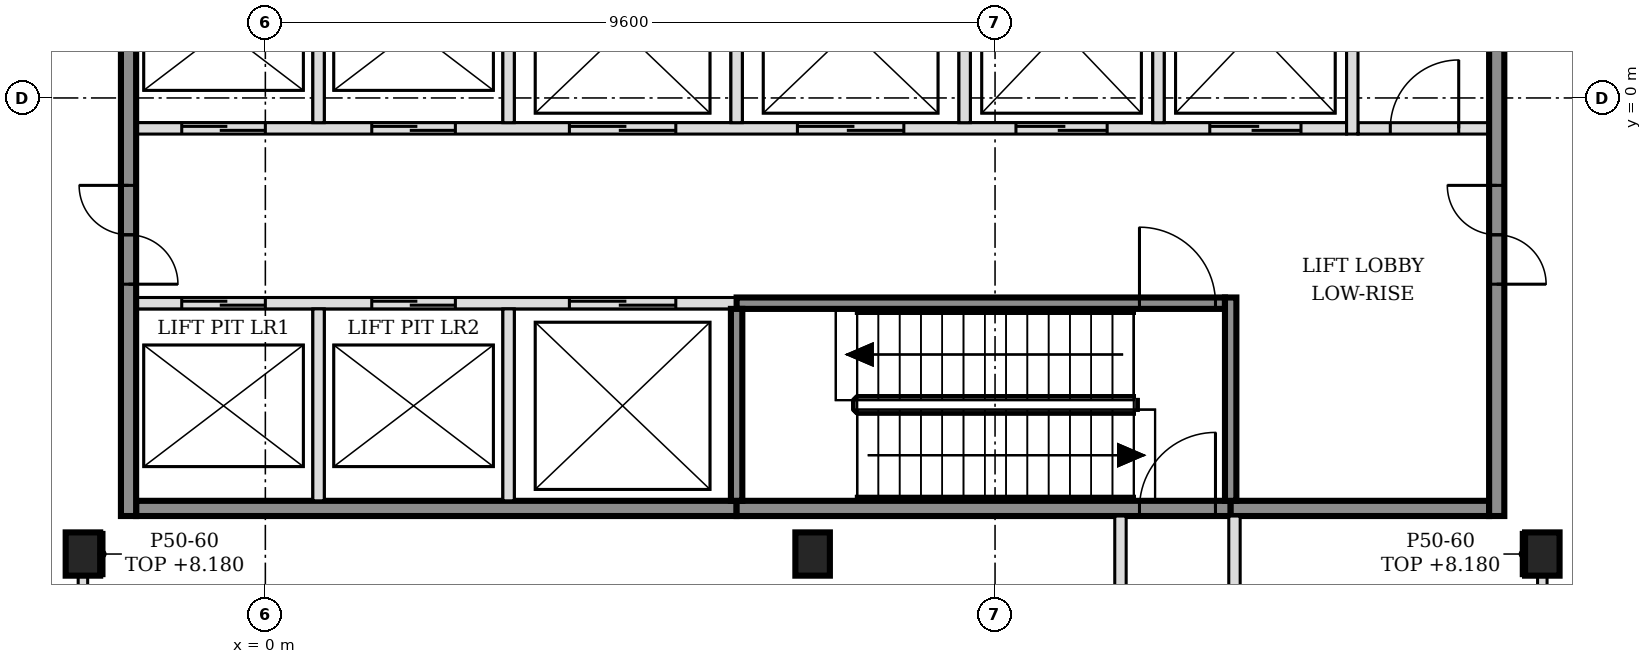
"""IFC4 building model, lengths in metres.
Left out: names, types, materials, properties, quantities, classifications, styles, units other than length and angle.
Written with IfcOpenShell. Run it as: python <this file> out.ifc"""

import sys

from ifc_helpers import new_model, si_unit, direction, frame, frame_2d, origin, origin_2d, place, context, subcontext, project, spatial, polyline, rectangle, i_section, outline, extrude, element, fill, save


model = new_model("IFC4")
c1 = context("Model", 3, precision=1e-05, world=origin(), true_north=direction((0.0, 1.0)))
c2 = subcontext(c1, "Body", "Model", "MODEL_VIEW")
j1 = project(units=[si_unit("LENGTHUNIT", "METRE"), si_unit("PLANEANGLEUNIT", "RADIAN")], contexts=[c1])
p1 = place(None, origin())
s1 = spatial("IfcSite", under=j1, at=p1, CompositionType="ELEMENT")
p2 = place(p1, origin())
s2 = spatial("IfcBuilding", under=s1, at=p2, CompositionType="ELEMENT")
p3 = place(p2, origin())
s3 = spatial("IfcBuildingStorey", under=s2, at=p3, CompositionType="ELEMENT", Elevation=0.0)
for number, where, z_axis, x_axis in (
    (1, (-2.4, -6.0, -0.25), (0.0, 0.0, 1.0), (1.0, 0.0, 0.0)),
    (2, (7.2, -6.0, -0.25), (0.0, 0.0, 1.0), (1.0, 0.0, 0.0)),
    (3, (16.8, -6.0, -0.25), (0.0, 0.0, 1.0), (1.0, 0.0, 0.0)),
):
    element("IfcColumn", number, at=place(p3, frame(where, z_axis=z_axis, x_axis=x_axis)), inside=s3, PredefinedType="COLUMN", context=c2, shape_type="SweptSolid", body=[
        extrude(i_section(OverallWidth=0.454, OverallDepth=0.569, WebThickness=0.078, FlangeThickness=0.125, FilletRadius=0.015, at=origin_2d()), origin(), (0.0, 0.0, 1.0), 9.05),
    ])
p4 = place(p3, frame((-1.7, -5.4, 0.0), z_axis=(0.0, 0.0, 1.0), x_axis=(1.0, 0.0, 0.0)))
e4 = element("IfcWall", 4, at=p4, inside=s3, PredefinedType="SOLIDWALL", context=c2, shape_type="SweptSolid", body=[
    extrude(rectangle(XDim=7.9, YDim=0.2, at=frame_2d((3.95, 0.0))), origin(), (0.0, 0.0, 1.0), 8.8),
])
p5 = place(p3, frame((6.2, -5.4, 0.0), z_axis=(0.0, 0.0, 1.0), x_axis=(1.0, 0.0, 0.0)))
e5 = element("IfcWall", 5, at=p5, inside=s3, PredefinedType="SOLIDWALL", context=c2, shape_type="SweptSolid", body=[
    extrude(rectangle(XDim=6.5, YDim=0.2, at=frame_2d((3.25, 0.0))), origin(), (0.0, 0.0, 1.0), 8.8),
])
p6 = place(p5, frame((5.3, 0.0, 0.0)))
e6 = element("IfcOpeningElement", 6, at=p6, cuts=e5, PredefinedType="OPENING", context=c2, shape_type="SweptSolid", body=[
    extrude(rectangle(XDim=1.0, YDim=2.1, at=frame_2d((0.5, 1.05))), frame((0.0, 0.11, 0.0), z_axis=(0.0, -1.0, 0.0), x_axis=(1.0, 0.0, 0.0)), (0.0, 0.0, 1.0), 0.22),
])
p7 = place(p3, frame((12.7, -5.4, 0.0), z_axis=(0.0, 0.0, 1.0), x_axis=(1.0, 0.0, 0.0)))
e7 = element("IfcWall", 7, at=p7, inside=s3, PredefinedType="SOLIDWALL", context=c2, shape_type="SweptSolid", body=[
    extrude(rectangle(XDim=3.4, YDim=0.2, at=frame_2d((1.7, 0.0))), origin(), (0.0, 0.0, 1.0), 8.8),
])
p8 = place(p3, frame((-1.7, -2.7, 0.0), z_axis=(0.0, 0.0, 1.0), x_axis=(1.0, 0.0, 0.0)))
e8 = element("IfcWall", 8, at=p8, inside=s3, PredefinedType="SOLIDWALL", context=c2, shape_type="SweptSolid", body=[
    extrude(rectangle(XDim=7.9, YDim=0.15, at=frame_2d((3.95, 0.0))), origin(), (0.0, 0.0, 1.0), 8.8),
])
p9 = place(p8, frame((0.6, 0.0, 0.0)))
e9 = element("IfcOpeningElement", 9, at=p9, cuts=e8, PredefinedType="OPENING", context=c2, shape_type="SweptSolid", body=[
    extrude(rectangle(XDim=1.1, YDim=2.1, at=frame_2d((0.55, 1.05))), frame((0.0, 0.085, 0.0), z_axis=(0.0, -1.0, 0.0), x_axis=(1.0, 0.0, 0.0)), (0.0, 0.0, 1.0), 0.17),
])
p10 = place(p8, frame((3.1, 0.0, 0.0)))
e10 = element("IfcOpeningElement", 10, at=p10, cuts=e8, PredefinedType="OPENING", context=c2, shape_type="SweptSolid", body=[
    extrude(rectangle(XDim=1.1, YDim=2.1, at=frame_2d((0.55, 1.05))), frame((0.0, 0.085, 0.0), z_axis=(0.0, -1.0, 0.0), x_axis=(1.0, 0.0, 0.0)), (0.0, 0.0, 1.0), 0.17),
])
p11 = place(p8, frame((5.7, 0.0, 0.0)))
e11 = element("IfcOpeningElement", 11, at=p11, cuts=e8, PredefinedType="OPENING", context=c2, shape_type="SweptSolid", body=[
    extrude(rectangle(XDim=1.4, YDim=2.1, at=frame_2d((0.7, 1.05))), frame((0.0, 0.085, 0.0), z_axis=(0.0, -1.0, 0.0), x_axis=(1.0, 0.0, 0.0)), (0.0, 0.0, 1.0), 0.17),
])
p12 = place(p3, frame((6.2, -2.7, 0.0), z_axis=(0.0, 0.0, 1.0), x_axis=(1.0, 0.0, 0.0)))
e12 = element("IfcWall", 12, at=p12, inside=s3, PredefinedType="SOLIDWALL", context=c2, shape_type="SweptSolid", body=[
    extrude(rectangle(XDim=6.425, YDim=0.15, at=frame_2d((3.212, 0.0))), origin(), (0.0, 0.0, 1.0), 8.8),
])
p13 = place(p12, frame((5.3, 0.0, 0.0)))
e13 = element("IfcOpeningElement", 13, at=p13, cuts=e12, PredefinedType="OPENING", context=c2, shape_type="SweptSolid", body=[
    extrude(rectangle(XDim=1.0, YDim=2.1, at=frame_2d((0.5, 1.05))), frame((0.0, 0.085, 0.0), z_axis=(0.0, -1.0, 0.0), x_axis=(1.0, 0.0, 0.0)), (0.0, 0.0, 1.0), 0.17),
])
p14 = place(p3, frame((-1.7, -0.4, 0.0), z_axis=(0.0, 0.0, 1.0), x_axis=(1.0, 0.0, 0.0)))
e14 = element("IfcWall", 14, at=p14, inside=s3, PredefinedType="SOLIDWALL", context=c2, shape_type="SweptSolid", body=[
    extrude(rectangle(XDim=15.925, YDim=0.15, at=frame_2d((7.962, 0.0))), origin(), (0.0, 0.0, 1.0), 8.8),
])
p15 = place(p14, frame((0.6, 0.0, 0.0)))
e15 = element("IfcOpeningElement", 15, at=p15, cuts=e14, PredefinedType="OPENING", context=c2, shape_type="SweptSolid", body=[
    extrude(rectangle(XDim=1.1, YDim=2.1, at=frame_2d((0.55, 1.05))), frame((0.0, 0.085, 0.0), z_axis=(0.0, -1.0, 0.0), x_axis=(1.0, 0.0, 0.0)), (0.0, 0.0, 1.0), 0.17),
])
p16 = place(p14, frame((3.1, 0.0, 0.0)))
e16 = element("IfcOpeningElement", 16, at=p16, cuts=e14, PredefinedType="OPENING", context=c2, shape_type="SweptSolid", body=[
    extrude(rectangle(XDim=1.1, YDim=2.1, at=frame_2d((0.55, 1.05))), frame((0.0, 0.085, 0.0), z_axis=(0.0, -1.0, 0.0), x_axis=(1.0, 0.0, 0.0)), (0.0, 0.0, 1.0), 0.17),
])
p17 = place(p14, frame((5.7, 0.0, 0.0)))
e17 = element("IfcOpeningElement", 17, at=p17, cuts=e14, PredefinedType="OPENING", context=c2, shape_type="SweptSolid", body=[
    extrude(rectangle(XDim=1.4, YDim=2.1, at=frame_2d((0.7, 1.05))), frame((0.0, 0.085, 0.0), z_axis=(0.0, -1.0, 0.0), x_axis=(1.0, 0.0, 0.0)), (0.0, 0.0, 1.0), 0.17),
])
p18 = place(p14, frame((8.7, 0.0, 0.0)))
e18 = element("IfcOpeningElement", 18, at=p18, cuts=e14, PredefinedType="OPENING", context=c2, shape_type="SweptSolid", body=[
    extrude(rectangle(XDim=1.4, YDim=2.1, at=frame_2d((0.7, 1.05))), frame((0.0, 0.085, 0.0), z_axis=(0.0, -1.0, 0.0), x_axis=(1.0, 0.0, 0.0)), (0.0, 0.0, 1.0), 0.17),
])
p19 = place(p14, frame((11.575, 0.0, 0.0)))
e19 = element("IfcOpeningElement", 19, at=p19, cuts=e14, PredefinedType="OPENING", context=c2, shape_type="SweptSolid", body=[
    extrude(rectangle(XDim=1.2, YDim=2.1, at=frame_2d((0.6, 1.05))), frame((0.0, 0.085, 0.0), z_axis=(0.0, -1.0, 0.0), x_axis=(1.0, 0.0, 0.0)), (0.0, 0.0, 1.0), 0.17),
])
p20 = place(p14, frame((14.125, 0.0, 0.0)))
e20 = element("IfcOpeningElement", 20, at=p20, cuts=e14, PredefinedType="OPENING", context=c2, shape_type="SweptSolid", body=[
    extrude(rectangle(XDim=1.2, YDim=2.1, at=frame_2d((0.6, 1.05))), frame((0.0, 0.085, 0.0), z_axis=(0.0, -1.0, 0.0), x_axis=(1.0, 0.0, 0.0)), (0.0, 0.0, 1.0), 0.17),
])
p21 = place(p3, frame((14.375, -0.4, 0.0), z_axis=(0.0, 0.0, 1.0), x_axis=(1.0, 0.0, 0.0)))
e21 = element("IfcWall", 21, at=p21, inside=s3, PredefinedType="PARTITIONING", context=c2, shape_type="SweptSolid", body=[
    extrude(rectangle(XDim=1.725, YDim=0.15, at=frame_2d((0.863, 0.0))), origin(), (0.0, 0.0, 1.0), 8.8),
])
p22 = place(p21, frame((0.425, 0.0, 0.0)))
e22 = element("IfcOpeningElement", 22, at=p22, cuts=e21, PredefinedType="OPENING", context=c2, shape_type="SweptSolid", body=[
    extrude(rectangle(XDim=0.9, YDim=2.1, at=frame_2d((0.45, 1.05))), frame((0.0, 0.085, 0.0), z_axis=(0.0, -1.0, 0.0), x_axis=(1.0, 0.0, 0.0)), (0.0, 0.0, 1.0), 0.17),
])
p23 = place(p3, frame((-1.8, -5.5, 0.0), z_axis=(0.0, 0.0, 1.0), x_axis=(0.0, 1.0, 0.0)))
e23 = element("IfcWall", 23, at=p23, inside=s3, PredefinedType="SOLIDWALL", context=c2, shape_type="SweptSolid", body=[
    extrude(rectangle(XDim=15.8, YDim=0.2, at=frame_2d((7.9, 0.0))), origin(), (0.0, 0.0, 1.0), 8.8),
])
p24 = place(p23, frame((3.05, 0.0, 0.0)))
e24 = element("IfcOpeningElement", 24, at=p24, cuts=e23, PredefinedType="OPENING", context=c2, shape_type="SweptSolid", body=[
    extrude(rectangle(XDim=1.3, YDim=2.1, at=frame_2d((0.65, 1.05))), frame((0.0, 0.11, 0.0), z_axis=(0.0, -1.0, 0.0), x_axis=(1.0, 0.0, 0.0)), (0.0, 0.0, 1.0), 0.22),
])
p25 = place(p23, frame((11.45, 0.0, 0.0)))
e25 = element("IfcOpeningElement", 25, at=p25, cuts=e23, PredefinedType="OPENING", context=c2, shape_type="SweptSolid", body=[
    extrude(rectangle(XDim=1.3, YDim=2.1, at=frame_2d((0.65, 1.05))), frame((0.0, 0.11, 0.0), z_axis=(0.0, -1.0, 0.0), x_axis=(1.0, 0.0, 0.0)), (0.0, 0.0, 1.0), 0.22),
])
p26 = place(p3, frame((0.7, -5.3, 0.0), z_axis=(0.0, 0.0, 1.0), x_axis=(0.0, 1.0, 0.0)))
e26 = element("IfcWall", 26, at=p26, inside=s3, PredefinedType="SOLIDWALL", context=c2, shape_type="SweptSolid", body=[
    extrude(rectangle(XDim=2.525, YDim=0.15, at=frame_2d((1.263, 0.0))), origin(), (0.0, 0.0, 1.0), 8.8),
])
p27 = place(p3, frame((0.7, -0.325, 0.0), z_axis=(0.0, 0.0, 1.0), x_axis=(0.0, 1.0, 0.0)))
e27 = element("IfcWall", 27, at=p27, inside=s3, PredefinedType="SOLIDWALL", context=c2, shape_type="SweptSolid", body=[
    extrude(rectangle(XDim=2.45, YDim=0.15, at=frame_2d((1.225, 0.0))), origin(), (0.0, 0.0, 1.0), 8.8),
])
p28 = place(p3, frame((3.2, -5.3, 0.0), z_axis=(0.0, 0.0, 1.0), x_axis=(0.0, 1.0, 0.0)))
e28 = element("IfcWall", 28, at=p28, inside=s3, PredefinedType="SOLIDWALL", context=c2, shape_type="SweptSolid", body=[
    extrude(rectangle(XDim=2.525, YDim=0.15, at=frame_2d((1.263, 0.0))), origin(), (0.0, 0.0, 1.0), 8.8),
])
p29 = place(p3, frame((3.2, -0.325, 0.0), z_axis=(0.0, 0.0, 1.0), x_axis=(0.0, 1.0, 0.0)))
e29 = element("IfcWall", 29, at=p29, inside=s3, PredefinedType="SOLIDWALL", context=c2, shape_type="SweptSolid", body=[
    extrude(rectangle(XDim=2.45, YDim=0.15, at=frame_2d((1.225, 0.0))), origin(), (0.0, 0.0, 1.0), 8.8),
])
p30 = place(p3, frame((6.2, -5.3, 0.0), z_axis=(0.0, 0.0, 1.0), x_axis=(0.0, 1.0, 0.0)))
e30 = element("IfcWall", 30, at=p30, inside=s3, PredefinedType="SOLIDWALL", context=c2, shape_type="SweptSolid", body=[
    extrude(rectangle(XDim=2.525, YDim=0.15, at=frame_2d((1.263, 0.0))), origin(), (0.0, 0.0, 1.0), 8.8),
])
for number, where, z_axis, x_axis in (
    (31, (6.2, -0.325, 0.0), (0.0, 0.0, 1.0), (0.0, 1.0, 0.0)),
    (32, (9.2, -0.325, 0.0), (0.0, 0.0, 1.0), (0.0, 1.0, 0.0)),
    (33, (11.75, -0.325, 0.0), (0.0, 0.0, 1.0), (0.0, 1.0, 0.0)),
):
    element("IfcWall", number, at=place(p3, frame(where, z_axis=z_axis, x_axis=x_axis)), inside=s3, PredefinedType="SOLIDWALL", context=c2, shape_type="SweptSolid", body=[
        extrude(rectangle(XDim=2.45, YDim=0.15, at=frame_2d((1.225, 0.0))), origin(), (0.0, 0.0, 1.0), 8.8),
    ])
p31 = place(p3, frame((12.7, -5.3, 0.0), z_axis=(0.0, 0.0, 1.0), x_axis=(0.0, 1.0, 0.0)))
e34 = element("IfcWall", 34, at=p31, inside=s3, PredefinedType="SOLIDWALL", context=c2, shape_type="SweptSolid", body=[
    extrude(rectangle(XDim=2.675, YDim=0.15, at=frame_2d((1.337, 0.0))), origin(), (0.0, 0.0, 1.0), 8.8),
])
p32 = place(p3, frame((14.3, -0.475, 0.0), z_axis=(0.0, 0.0, 1.0), x_axis=(0.0, 1.0, 0.0)))
e35 = element("IfcWall", 35, at=p32, inside=s3, PredefinedType="SOLIDWALL", context=c2, shape_type="SweptSolid", body=[
    extrude(rectangle(XDim=2.75, YDim=0.15, at=frame_2d((1.375, 0.0))), origin(), (0.0, 0.0, 1.0), 8.8),
])
p33 = place(p3, frame((16.2, -5.5, 0.0), z_axis=(0.0, 0.0, 1.0), x_axis=(0.0, 1.0, 0.0)))
e36 = element("IfcWall", 36, at=p33, inside=s3, PredefinedType="SOLIDWALL", context=c2, shape_type="SweptSolid", body=[
    extrude(rectangle(XDim=15.8, YDim=0.2, at=frame_2d((7.9, 0.0))), origin(), (0.0, 0.0, 1.0), 8.8),
])
p34 = place(p33, frame((3.05, 0.0, 0.0)))
e37 = element("IfcOpeningElement", 37, at=p34, cuts=e36, PredefinedType="OPENING", context=c2, shape_type="SweptSolid", body=[
    extrude(rectangle(XDim=1.3, YDim=2.1, at=frame_2d((0.65, 1.05))), frame((0.0, 0.11, 0.0), z_axis=(0.0, -1.0, 0.0), x_axis=(1.0, 0.0, 0.0)), (0.0, 0.0, 1.0), 0.22),
])
p35 = place(p33, frame((11.45, 0.0, 0.0)))
e38 = element("IfcOpeningElement", 38, at=p35, cuts=e36, PredefinedType="OPENING", context=c2, shape_type="SweptSolid", body=[
    extrude(rectangle(XDim=1.3, YDim=2.1, at=frame_2d((0.65, 1.05))), frame((0.0, 0.11, 0.0), z_axis=(0.0, -1.0, 0.0), x_axis=(1.0, 0.0, 0.0)), (0.0, 0.0, 1.0), 0.22),
])
for number, where, z_axis, x_axis in (
    (39, (11.25, -23.9, 0.0), (0.0, 0.0, 1.0), (0.0, 1.0, 0.0)),
    (40, (12.75, -23.9, 0.0), (0.0, 0.0, 1.0), (0.0, 1.0, 0.0)),
):
    element("IfcWall", number, at=place(p3, frame(where, z_axis=z_axis, x_axis=x_axis)), inside=s3, PredefinedType="SOLIDWALL", context=c2, shape_type="SweptSolid", body=[
        extrude(rectangle(XDim=18.4, YDim=0.15, at=frame_2d((9.2, 0.0))), origin(), (0.0, 0.0, 1.0), 8.8),
    ])
p36 = place(p3, frame((16.8, -9.938, 0.0), z_axis=(0.0, 0.0, 1.0), x_axis=(0.0, 1.0, 0.0)))
e41 = element("IfcWall", 41, at=p36, inside=s3, PredefinedType="PARTITIONING", context=c2, shape_type="SweptSolid", body=[
    extrude(outline(polyline([(0.0, 0.0), (3.653, 0.0), (3.653, 8.8), (1.688, 8.8), (1.686, 8.08), (1.387, 8.08), (1.385, 8.8), (0.0, 8.8), (0.0, 0.0)])), frame((0.0, 0.062, 0.0), z_axis=(0.0, -1.0, 0.0), x_axis=(1.0, 0.0, 0.0)), (0.0, 0.0, 1.0), 0.125),
])
p37 = place(p3, frame((-2.4, -9.0, 0.0), z_axis=(0.0, 0.0, 1.0), x_axis=(0.0, 1.0, 0.0)))
e42 = element("IfcWall", 42, at=p37, inside=s3, PredefinedType="PARTITIONING", context=c2, shape_type="SweptSolid", body=[
    extrude(outline(polyline([(0.0, 0.0), (2.716, 0.0), (2.716, 8.8), (0.75, 8.8), (0.748, 8.08), (0.45, 8.08), (0.448, 8.8), (0.0, 8.8), (0.0, 0.0)])), frame((0.0, 0.062, 0.0), z_axis=(0.0, -1.0, 0.0), x_axis=(1.0, 0.0, 0.0)), (0.0, 0.0, 1.0), 0.125),
])
p38 = place(p37, frame((1.0, 0.0, 0.0)))
e43 = element("IfcOpeningElement", 43, at=p38, cuts=e42, PredefinedType="OPENING", context=c2, shape_type="SweptSolid", body=[
    extrude(rectangle(XDim=1.0, YDim=2.1, at=frame_2d((0.5, 1.05))), frame((0.0, 0.073, 0.0), z_axis=(0.0, -1.0, 0.0), x_axis=(1.0, 0.0, 0.0)), (0.0, 0.0, 1.0), 0.145),
])
for number, where, z_axis, x_axis in (
    (44, (16.548, -6.284, 0.0), (0.0, 0.0, 1.0), (0.0, 1.0, 0.0)),
    (45, (-2.148, -6.284, 0.0), (0.0, 0.0, 1.0), (0.0, 1.0, 0.0)),
):
    element("IfcWall", number, at=place(p3, frame(where, z_axis=z_axis, x_axis=x_axis)), inside=s3, PredefinedType="PARTITIONING", context=c2, shape_type="SweptSolid", body=[
        extrude(rectangle(XDim=0.569, YDim=0.05, at=frame_2d((0.284, 0.0))), origin(), (0.0, 0.0, 1.0), 8.18),
    ])
p39 = place(p9, origin())
e46 = element("IfcDoor", 46, at=p39, inside=s3, OperationType="DOUBLE_DOOR_SLIDING", PredefinedType="DOOR", context=c2, shape_type="SweptSolid", body=[
    extrude(rectangle(XDim=1.1, YDim=2.1, at=frame_2d((0.55, 1.05))), frame((0.0, 0.025, 0.0), z_axis=(0.0, -1.0, 0.0), x_axis=(1.0, 0.0, 0.0)), (0.0, 0.0, 1.0), 0.05),
])
fill(e9, e46)
p40 = place(p10, origin())
e47 = element("IfcDoor", 47, at=p40, inside=s3, OperationType="DOUBLE_DOOR_SLIDING", PredefinedType="DOOR", context=c2, shape_type="SweptSolid", body=[
    extrude(rectangle(XDim=1.1, YDim=2.1, at=frame_2d((0.55, 1.05))), frame((0.0, 0.025, 0.0), z_axis=(0.0, -1.0, 0.0), x_axis=(1.0, 0.0, 0.0)), (0.0, 0.0, 1.0), 0.05),
])
fill(e10, e47)
p41 = place(p15, origin())
e48 = element("IfcDoor", 48, at=p41, inside=s3, OperationType="DOUBLE_DOOR_SLIDING", PredefinedType="DOOR", context=c2, shape_type="SweptSolid", body=[
    extrude(rectangle(XDim=1.1, YDim=2.1, at=frame_2d((0.55, 1.05))), frame((0.0, 0.025, 0.0), z_axis=(0.0, -1.0, 0.0), x_axis=(1.0, 0.0, 0.0)), (0.0, 0.0, 1.0), 0.05),
])
fill(e15, e48)
p42 = place(p16, origin())
e49 = element("IfcDoor", 49, at=p42, inside=s3, OperationType="DOUBLE_DOOR_SLIDING", PredefinedType="DOOR", context=c2, shape_type="SweptSolid", body=[
    extrude(rectangle(XDim=1.1, YDim=2.1, at=frame_2d((0.55, 1.05))), frame((0.0, 0.025, 0.0), z_axis=(0.0, -1.0, 0.0), x_axis=(1.0, 0.0, 0.0)), (0.0, 0.0, 1.0), 0.05),
])
fill(e16, e49)
p43 = place(p11, origin())
e50 = element("IfcDoor", 50, at=p43, inside=s3, OperationType="DOUBLE_DOOR_SLIDING", PredefinedType="DOOR", context=c2, shape_type="SweptSolid", body=[
    extrude(rectangle(XDim=1.4, YDim=2.1, at=frame_2d((0.7, 1.05))), frame((0.0, 0.025, 0.0), z_axis=(0.0, -1.0, 0.0), x_axis=(1.0, 0.0, 0.0)), (0.0, 0.0, 1.0), 0.05),
])
fill(e11, e50)
p44 = place(p17, origin())
e51 = element("IfcDoor", 51, at=p44, inside=s3, OperationType="DOUBLE_DOOR_SLIDING", PredefinedType="DOOR", context=c2, shape_type="SweptSolid", body=[
    extrude(rectangle(XDim=1.4, YDim=2.1, at=frame_2d((0.7, 1.05))), frame((0.0, 0.025, 0.0), z_axis=(0.0, -1.0, 0.0), x_axis=(1.0, 0.0, 0.0)), (0.0, 0.0, 1.0), 0.05),
])
fill(e17, e51)
p45 = place(p18, origin())
e52 = element("IfcDoor", 52, at=p45, inside=s3, OperationType="DOUBLE_DOOR_SLIDING", PredefinedType="DOOR", context=c2, shape_type="SweptSolid", body=[
    extrude(rectangle(XDim=1.4, YDim=2.1, at=frame_2d((0.7, 1.05))), frame((0.0, 0.025, 0.0), z_axis=(0.0, -1.0, 0.0), x_axis=(1.0, 0.0, 0.0)), (0.0, 0.0, 1.0), 0.05),
])
fill(e18, e52)
p46 = place(p19, origin())
e53 = element("IfcDoor", 53, at=p46, inside=s3, OperationType="DOUBLE_DOOR_SLIDING", PredefinedType="DOOR", context=c2, shape_type="SweptSolid", body=[
    extrude(rectangle(XDim=1.2, YDim=2.1, at=frame_2d((0.6, 1.05))), frame((0.0, 0.025, 0.0), z_axis=(0.0, -1.0, 0.0), x_axis=(1.0, 0.0, 0.0)), (0.0, 0.0, 1.0), 0.05),
])
fill(e19, e53)
p47 = place(p20, origin())
e54 = element("IfcDoor", 54, at=p47, inside=s3, OperationType="DOUBLE_DOOR_SLIDING", PredefinedType="DOOR", context=c2, shape_type="SweptSolid", body=[
    extrude(rectangle(XDim=1.2, YDim=2.1, at=frame_2d((0.6, 1.05))), frame((0.0, 0.025, 0.0), z_axis=(0.0, -1.0, 0.0), x_axis=(1.0, 0.0, 0.0)), (0.0, 0.0, 1.0), 0.05),
])
fill(e20, e54)
p48 = place(p13, origin())
e55 = element("IfcDoor", 55, at=p48, inside=s3, OperationType="SINGLE_SWING_LEFT", PredefinedType="DOOR", context=c2, shape_type="SweptSolid", body=[
    extrude(rectangle(XDim=1.0, YDim=2.1, at=frame_2d((0.5, 1.05))), frame((0.0, 0.025, 0.0), z_axis=(0.0, -1.0, 0.0), x_axis=(1.0, 0.0, 0.0)), (0.0, 0.0, 1.0), 0.05),
])
fill(e13, e55)
p49 = place(p6, origin())
e56 = element("IfcDoor", 56, at=p49, inside=s3, OperationType="SINGLE_SWING_RIGHT", PredefinedType="DOOR", context=c2, shape_type="SweptSolid", body=[
    extrude(rectangle(XDim=1.0, YDim=2.1, at=frame_2d((0.5, 1.05))), frame((0.0, 0.025, 0.0), z_axis=(0.0, -1.0, 0.0), x_axis=(1.0, 0.0, 0.0)), (0.0, 0.0, 1.0), 0.05),
])
fill(e6, e56)
p50 = place(p24, origin())
e57 = element("IfcDoor", 57, at=p50, inside=s3, OperationType="DOUBLE_DOOR_SINGLE_SWING", PredefinedType="DOOR", context=c2, shape_type="SweptSolid", body=[
    extrude(rectangle(XDim=1.3, YDim=2.1, at=frame_2d((0.65, 1.05))), frame((0.0, 0.025, 0.0), z_axis=(0.0, -1.0, 0.0), x_axis=(1.0, 0.0, 0.0)), (0.0, 0.0, 1.0), 0.05),
])
fill(e24, e57)
p51 = place(p34, origin())
e58 = element("IfcDoor", 58, at=p51, inside=s3, OperationType="DOUBLE_DOOR_SINGLE_SWING", PredefinedType="DOOR", context=c2, shape_type="SweptSolid", body=[
    extrude(rectangle(XDim=1.3, YDim=2.1, at=frame_2d((0.65, 1.05))), frame((0.0, 0.025, 0.0), z_axis=(0.0, -1.0, 0.0), x_axis=(1.0, 0.0, 0.0)), (0.0, 0.0, 1.0), 0.05),
])
fill(e37, e58)
p52 = place(p22, origin())
e59 = element("IfcDoor", 59, at=p52, inside=s3, OperationType="SINGLE_SWING_RIGHT", PredefinedType="DOOR", context=c2, shape_type="SweptSolid", body=[
    extrude(rectangle(XDim=0.9, YDim=2.1, at=frame_2d((0.45, 1.05))), frame((0.0, 0.025, 0.0), z_axis=(0.0, -1.0, 0.0), x_axis=(1.0, 0.0, 0.0)), (0.0, 0.0, 1.0), 0.05),
])
fill(e22, e59)
save(model, sys.argv[1])
